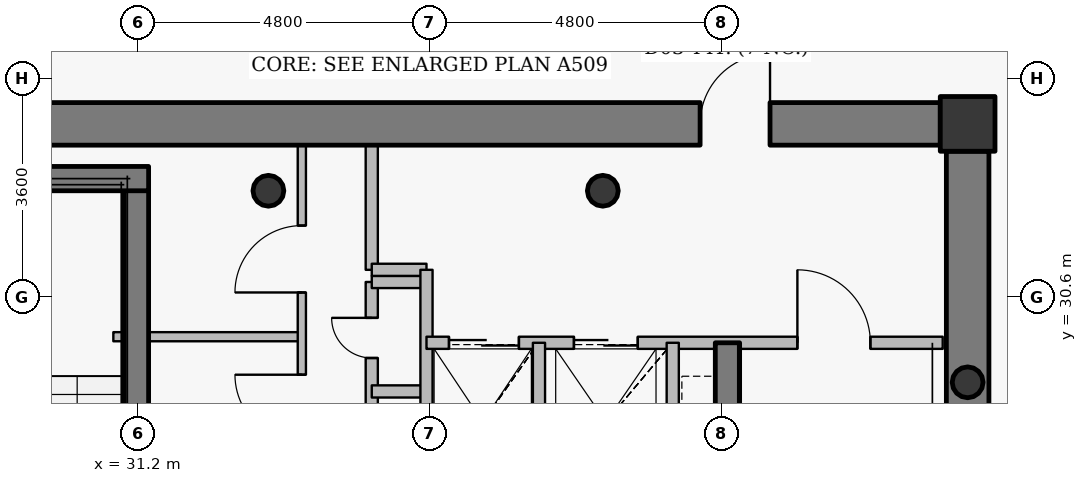
"""IFC4 building model, lengths in metres.
Left out: names, types, materials, properties, quantities, classifications, styles, units other than length and angle.
Written with IfcOpenShell. Run it as: python <this file> out.ifc"""

import sys

from ifc_helpers import new_model, si_unit, direction, frame, frame_2d, origin, origin_2d, place, context, subcontext, project, spatial, rectangle, hollow_circle, extrude, source, transform, mapped, element, fill, save


model = new_model("IFC4")
c1 = context("Model", 3, precision=1e-05, world=origin(), true_north=direction((0.0, 1.0)))
c2 = subcontext(c1, "Body", "Model", "MODEL_VIEW")
j1 = project(units=[si_unit("LENGTHUNIT", "METRE"), si_unit("PLANEANGLEUNIT", "RADIAN")], contexts=[c1])
p1 = place(None, origin())
s1 = spatial("IfcSite", under=j1, at=p1, CompositionType="ELEMENT")
p2 = place(p1, origin())
s2 = spatial("IfcBuilding", under=s1, at=p2, CompositionType="ELEMENT")
p3 = place(p2, frame((0.0, 0.0, 335.4)))
s3 = spatial("IfcBuildingStorey", under=s2, at=p3, CompositionType="ELEMENT", Elevation=335.4)
p4 = place(p3, frame((44.85, 33.45, 0.0), z_axis=(0.0, 0.0, 1.0), x_axis=(1.0, 0.0, 0.0)))
e1 = element("IfcColumn", 1, at=p4, inside=s3, PredefinedType="COLUMN", context=c2, shape_type="SweptSolid", body=[
    extrude(rectangle(XDim=0.9, YDim=0.9, at=origin_2d()), origin(), (0.0, 0.0, 1.0), 3.8),
])
for number, where, z_axis, x_axis in (
    (2, (38.85, 32.35, 0.0), (0.0, 0.0, 1.0), (1.0, 0.0, 0.0)),
    (3, (33.35, 32.35, 0.0), (0.0, 0.0, 1.0), (1.0, 0.0, 0.0)),
):
    element("IfcColumn", number, at=place(p3, frame(where, z_axis=z_axis, x_axis=x_axis)), inside=s3, PredefinedType="COLUMN", context=c2, shape_type="SweptSolid", body=[
        extrude(hollow_circle(Radius=0.254, WallThickness=0.02, at=origin_2d()), origin(), (0.0, 0.0, 1.0), 3.8),
    ])
p5 = place(p3, frame((31.18, 27.8, 0.0), z_axis=(0.0, 0.0, 1.0), x_axis=(0.0, 1.0, 0.0)))
e4 = element("IfcWall", 4, at=p5, inside=s3, PredefinedType="SHEAR", context=c2, shape_type="SweptSolid", body=[
    extrude(rectangle(XDim=4.75, YDim=0.4, at=frame_2d((2.375, 0.0))), origin(), (0.0, 0.0, 1.0), 3.8),
])
p6 = place(p3, frame((27.25, 32.55, 0.0), z_axis=(0.0, 0.0, 1.0), x_axis=(1.0, 0.0, 0.0)))
e5 = element("IfcWall", 5, at=p6, inside=s3, PredefinedType="SHEAR", context=c2, shape_type="SweptSolid", body=[
    extrude(rectangle(XDim=4.13, YDim=0.4, at=frame_2d((2.065, 0.0))), origin(), (0.0, 0.0, 1.0), 3.8),
])
p7 = place(p3, frame((27.6, 33.45, 0.0), z_axis=(0.0, 0.0, 1.0), x_axis=(1.0, 0.0, 0.0)))
e6 = element("IfcWall", 6, at=p7, inside=s3, PredefinedType="SHEAR", context=c2, shape_type="SweptSolid", body=[
    extrude(rectangle(XDim=16.8, YDim=0.7, at=frame_2d((8.4, 0.0))), origin(), (0.0, 0.0, 1.0), 3.1),
])
p8 = place(p7, frame((12.85, 0.0, 0.0)))
e7 = element("IfcOpeningElement", 7, at=p8, cuts=e6, PredefinedType="OPENING", context=c2, shape_type="SweptSolid", body=[
    extrude(rectangle(XDim=1.15, YDim=2.15, at=origin_2d()), frame((0.575, 0.36, 1.075), z_axis=(0.0, -1.0, 0.0), x_axis=(1.0, 0.0, 0.0)), (0.0, 0.0, 1.0), 0.72),
])
p9 = place(p3, frame((44.85, 33.0, 0.0), z_axis=(0.0, 0.0, 1.0), x_axis=(0.0, -1.0, 0.0)))
e8 = element("IfcWall", 8, at=p9, inside=s3, PredefinedType="SHEAR", context=c2, shape_type="SweptSolid", body=[
    extrude(rectangle(XDim=12.0, YDim=0.7, at=frame_2d((6.0, 0.0))), origin(), (0.0, 0.0, 1.0), 3.1),
])
p10 = place(p3, frame((40.9, 27.25, 0.0), z_axis=(0.0, 0.0, 1.0), x_axis=(0.0, 1.0, 0.0)))
e9 = element("IfcWall", 9, at=p10, inside=s3, PredefinedType="SHEAR", context=c2, shape_type="SweptSolid", body=[
    extrude(rectangle(XDim=2.6, YDim=0.4, at=frame_2d((1.3, 0.0))), origin(), (0.0, 0.0, 1.0), 3.15),
])
p11 = place(p3, frame((44.85, 29.2, 0.0), z_axis=(0.0, 0.0, 1.0), x_axis=(1.0, 0.0, 0.0)))
e10 = element("IfcColumn", 10, at=p11, inside=s3, PredefinedType="COLUMN", context=c2, shape_type="SweptSolid", body=[
    extrude(hollow_circle(Radius=0.254, WallThickness=0.02, at=origin_2d()), origin(), (0.0, 0.0, 1.0), 3.8),
])
p12 = place(p3, frame((30.8, 29.95, 0.0), z_axis=(0.0, 0.0, 1.0), x_axis=(1.0, 0.0, 0.0)))
e11 = element("IfcWall", 11, at=p12, inside=s3, PredefinedType="PARTITIONING", context=c2, shape_type="SweptSolid", body=[
    extrude(rectangle(XDim=3.1, YDim=0.15, at=frame_2d((1.55, 0.0))), origin(), (0.0, 0.0, 1.0), 3.135),
])
p13 = place(p3, frame((33.9, 27.56, 0.0), z_axis=(0.0, 0.0, 1.0), x_axis=(0.0, 1.0, 0.0)))
e12 = element("IfcWall", 12, at=p13, inside=s3, PredefinedType="PARTITIONING", context=c2, shape_type="SweptSolid", body=[
    extrude(rectangle(XDim=5.54, YDim=0.135, at=frame_2d((2.77, 0.0))), origin(), (0.0, 0.0, 1.0), 3.135),
])
p14 = place(p13, frame((0.665, 0.0, 0.0)))
e13 = element("IfcOpeningElement", 13, at=p14, cuts=e12, PredefinedType="OPENING", context=c2, shape_type="SweptSolid", body=[
    extrude(rectangle(XDim=1.1, YDim=2.15, at=origin_2d()), frame((0.55, 0.078, 1.075), z_axis=(0.0, -1.0, 0.0), x_axis=(1.0, 0.0, 0.0)), (0.0, 0.0, 1.0), 0.155),
])
p15 = place(p13, frame((3.117, 0.0, 0.0)))
e14 = element("IfcOpeningElement", 14, at=p15, cuts=e12, PredefinedType="OPENING", context=c2, shape_type="SweptSolid", body=[
    extrude(rectangle(XDim=1.1, YDim=2.15, at=origin_2d()), frame((0.55, 0.078, 1.075), z_axis=(0.0, -1.0, 0.0), x_axis=(1.0, 0.0, 0.0)), (0.0, 0.0, 1.0), 0.155),
])
p16 = place(p3, frame((35.05, 27.25, 0.0), z_axis=(0.0, 0.0, 1.0), x_axis=(0.0, 1.0, 0.0)))
e15 = element("IfcWall", 15, at=p16, inside=s3, PredefinedType="PARTITIONING", context=c2, shape_type="SweptSolid", body=[
    extrude(rectangle(XDim=3.6, YDim=0.2, at=frame_2d((1.8, 0.0))), origin(), (0.0, 0.0, 1.0), 3.55),
])
p17 = place(p16, frame((0.59, 0.0, 0.0)))
e16 = element("IfcOpeningElement", 16, at=p17, cuts=e15, PredefinedType="OPENING", context=c2, shape_type="SweptSolid", body=[
    extrude(rectangle(XDim=0.66, YDim=2.05, at=origin_2d()), frame((0.33, 0.11, 1.025), z_axis=(0.0, -1.0, 0.0), x_axis=(1.0, 0.0, 0.0)), (0.0, 0.0, 1.0), 0.22),
])
p18 = place(p16, frame((2.35, 0.0, 0.0)))
e17 = element("IfcOpeningElement", 17, at=p18, cuts=e15, PredefinedType="OPENING", context=c2, shape_type="SweptSolid", body=[
    extrude(rectangle(XDim=0.66, YDim=2.05, at=origin_2d()), frame((0.33, 0.11, 1.025), z_axis=(0.0, -1.0, 0.0), x_axis=(1.0, 0.0, 0.0)), (0.0, 0.0, 1.0), 0.22),
])
for number, where, z_axis, x_axis in (
    (18, (35.05, 29.05, 0.0), (0.0, 0.0, 1.0), (1.0, 0.0, 0.0)),
    (19, (35.05, 30.85, 0.0), (0.0, 0.0, 1.0), (1.0, 0.0, 0.0)),
):
    element("IfcWall", number, at=place(p3, frame(where, z_axis=z_axis, x_axis=x_axis)), inside=s3, PredefinedType="PARTITIONING", context=c2, shape_type="SweptSolid", body=[
        extrude(rectangle(XDim=0.9, YDim=0.2, at=frame_2d((0.45, 0.0))), origin(), (0.0, 0.0, 1.0), 3.55),
    ])
p19 = place(p3, frame((35.05, 31.05, 0.0), z_axis=(0.0, 0.0, 1.0), x_axis=(0.0, 1.0, 0.0)))
e20 = element("IfcWall", 20, at=p19, inside=s3, PredefinedType="PARTITIONING", context=c2, shape_type="SweptSolid", body=[
    extrude(rectangle(XDim=2.05, YDim=0.2, at=frame_2d((1.025, 0.0))), origin(), (0.0, 0.0, 1.0), 3.135),
])
p20 = place(p3, frame((35.05, 31.05, 0.0), z_axis=(0.0, 0.0, 1.0), x_axis=(1.0, 0.0, 0.0)))
e21 = element("IfcWall", 21, at=p20, inside=s3, PredefinedType="PARTITIONING", context=c2, shape_type="SweptSolid", body=[
    extrude(rectangle(XDim=0.9, YDim=0.2, at=frame_2d((0.45, 0.0))), origin(), (0.0, 0.0, 1.0), 3.55),
])
p21 = place(p3, frame((35.95, 27.25, 0.0), z_axis=(0.0, 0.0, 1.0), x_axis=(0.0, 1.0, 0.0)))
e22 = element("IfcWall", 22, at=p21, inside=s3, PredefinedType="PARTITIONING", context=c2, shape_type="SweptSolid", body=[
    extrude(rectangle(XDim=3.8, YDim=0.2, at=frame_2d((1.9, 0.0))), origin(), (0.0, 0.0, 1.0), 3.55),
])
p22 = place(p3, frame((35.95, 29.85, 0.0), z_axis=(0.0, 0.0, 1.0), x_axis=(1.0, 0.0, 0.0)))
e23 = element("IfcWall", 23, at=p22, inside=s3, PredefinedType="PARTITIONING", context=c2, shape_type="SweptSolid", body=[
    extrude(rectangle(XDim=8.49, YDim=0.2, at=frame_2d((4.245, 0.0))), origin(), (0.0, 0.0, 1.0), 3.135),
])
p23 = place(p22, frame((6.1, 0.0, 0.0)))
e24 = element("IfcOpeningElement", 24, at=p23, cuts=e23, PredefinedType="OPENING", context=c2, shape_type="SweptSolid", body=[
    extrude(rectangle(XDim=1.2, YDim=2.15, at=origin_2d()), frame((0.6, 0.11, 1.075), z_axis=(0.0, -1.0, 0.0), x_axis=(1.0, 0.0, 0.0)), (0.0, 0.0, 1.0), 0.22),
])
p24 = place(p22, frame((0.37, 0.0, 0.0)))
e25 = element("IfcOpeningElement", 25, at=p24, cuts=e23, PredefinedType="OPENING", context=c2, shape_type="SweptSolid", body=[
    extrude(rectangle(XDim=1.15, YDim=2.15, at=origin_2d()), frame((0.575, 0.11, 1.075), z_axis=(0.0, -1.0, 0.0), x_axis=(1.0, 0.0, 0.0)), (0.0, 0.0, 1.0), 0.22),
])
p25 = place(p22, frame((2.425, 0.0, 0.0)))
e26 = element("IfcOpeningElement", 26, at=p25, cuts=e23, PredefinedType="OPENING", context=c2, shape_type="SweptSolid", body=[
    extrude(rectangle(XDim=1.05, YDim=2.15, at=origin_2d()), frame((0.525, 0.11, 1.075), z_axis=(0.0, -1.0, 0.0), x_axis=(1.0, 0.0, 0.0)), (0.0, 0.0, 1.0), 0.22),
])
p26 = place(p3, frame((37.8, 27.25, 0.0), z_axis=(0.0, 0.0, 1.0), x_axis=(0.0, 1.0, 0.0)))
e27 = element("IfcWall", 27, at=p26, inside=s3, PredefinedType="PARTITIONING", context=c2, shape_type="SweptSolid", body=[
    extrude(rectangle(XDim=2.6, YDim=0.2, at=frame_2d((1.3, 0.0))), origin(), (0.0, 0.0, 1.0), 3.55),
])
p27 = place(p3, frame((40.0, 25.45, 0.0), z_axis=(0.0, 0.0, 1.0), x_axis=(0.0, 1.0, 0.0)))
e28 = element("IfcWall", 28, at=p27, inside=s3, PredefinedType="PARTITIONING", context=c2, shape_type="SweptSolid", body=[
    extrude(rectangle(XDim=4.4, YDim=0.2, at=frame_2d((2.2, 0.0))), origin(), (0.0, 0.0, 1.0), 3.55),
])
p28 = place(p3, frame((45.2, 33.8, 0.0), z_axis=(0.0, 0.0, 1.0), x_axis=(-1.0, 0.0, 0.0)))
e29 = element("IfcWall", 29, at=p28, inside=s3, PredefinedType="PARTITIONING", context=c2, shape_type="SweptSolid", body=[
    extrude(rectangle(XDim=0.79, YDim=0.135, at=frame_2d((0.395, 0.0))), origin(), (0.0, 0.0, 1.0), 3.085),
])
p29 = place(p3, frame((45.2, 33.01, 0.0), z_axis=(0.0, 0.0, 1.0), x_axis=(0.0, 1.0, 0.0)))
e30 = element("IfcWall", 30, at=p29, inside=s3, PredefinedType="PARTITIONING", context=c2, shape_type="SweptSolid", body=[
    extrude(rectangle(XDim=0.482, YDim=0.135, at=frame_2d((0.241, 0.0))), origin(), (0.0, 0.0, 1.0), 3.55),
])
m1 = source(origin(), c2, "Body", "SweptSolid", [
    extrude(rectangle(XDim=1.15, YDim=2.15, at=origin_2d()), frame((0.575, 0.025, 1.075), z_axis=(0.0, -1.0, 0.0), x_axis=(1.0, 0.0, 0.0)), (0.0, 0.0, 1.0), 0.05),
])
p30 = place(p8, origin())
e31 = element("IfcDoor", 31, at=p30, inside=s3, OperationType="SINGLE_SWING_RIGHT", PredefinedType="DOOR", context=c2, shape_type="MappedRepresentation", body=[
    mapped(m1, transform((0.0, 0.0, 0.0), x_axis=(1.0, 0.0, 0.0), y_axis=(0.0, 1.0, 0.0), z_axis=(0.0, 0.0, 1.0), scale=1.0)),
])
fill(e7, e31)
m2 = source(origin(), c2, "Body", "SweptSolid", [
    extrude(rectangle(XDim=1.2, YDim=2.15, at=origin_2d()), frame((0.6, 0.025, 1.075), z_axis=(0.0, -1.0, 0.0), x_axis=(1.0, 0.0, 0.0)), (0.0, 0.0, 1.0), 0.05),
])
p31 = place(p23, origin())
e32 = element("IfcDoor", 32, at=p31, inside=s3, OperationType="SINGLE_SWING_LEFT", PredefinedType="DOOR", context=c2, shape_type="MappedRepresentation", body=[
    mapped(m2, transform((0.0, 0.0, 0.0), x_axis=(1.0, 0.0, 0.0), y_axis=(0.0, 1.0, 0.0), z_axis=(0.0, 0.0, 1.0), scale=1.0)),
])
fill(e24, e32)
m3 = source(origin(), c2, "Body", "SweptSolid", [
    extrude(rectangle(XDim=1.15, YDim=2.15, at=origin_2d()), frame((0.575, 0.025, 1.075), z_axis=(0.0, -1.0, 0.0), x_axis=(1.0, 0.0, 0.0)), (0.0, 0.0, 1.0), 0.05),
])
p32 = place(p24, origin())
e33 = element("IfcDoor", 33, at=p32, inside=s3, OperationType="DOUBLE_DOOR_SLIDING", PredefinedType="USERDEFINED", context=c2, shape_type="MappedRepresentation", body=[
    mapped(m3, transform((0.0, 0.0, 0.0), x_axis=(1.0, 0.0, 0.0), y_axis=(0.0, 1.0, 0.0), z_axis=(0.0, 0.0, 1.0), scale=1.0)),
])
fill(e25, e33)
m4 = source(origin(), c2, "Body", "SweptSolid", [
    extrude(rectangle(XDim=1.05, YDim=2.15, at=origin_2d()), frame((0.525, 0.025, 1.075), z_axis=(0.0, -1.0, 0.0), x_axis=(1.0, 0.0, 0.0)), (0.0, 0.0, 1.0), 0.05),
])
p33 = place(p25, origin())
e34 = element("IfcDoor", 34, at=p33, inside=s3, OperationType="DOUBLE_DOOR_SLIDING", PredefinedType="USERDEFINED", context=c2, shape_type="MappedRepresentation", body=[
    mapped(m4, transform((0.0, 0.0, 0.0), x_axis=(1.0, 0.0, 0.0), y_axis=(0.0, 1.0, 0.0), z_axis=(0.0, 0.0, 1.0), scale=1.0)),
])
fill(e26, e34)
m5 = source(origin(), c2, "Body", "SweptSolid", [
    extrude(rectangle(XDim=0.66, YDim=2.05, at=origin_2d()), frame((0.33, 0.025, 1.025), z_axis=(0.0, -1.0, 0.0), x_axis=(1.0, 0.0, 0.0)), (0.0, 0.0, 1.0), 0.05),
])
p34 = place(p18, origin())
e35 = element("IfcDoor", 35, at=p34, inside=s3, OperationType="SINGLE_SWING_RIGHT", PredefinedType="USERDEFINED", context=c2, shape_type="MappedRepresentation", body=[
    mapped(m5, transform((0.0, 0.0, 0.0), x_axis=(1.0, 0.0, 0.0), y_axis=(0.0, 1.0, 0.0), z_axis=(0.0, 0.0, 1.0), scale=1.0)),
])
fill(e17, e35)
m6 = source(origin(), c2, "Body", "SweptSolid", [
    extrude(rectangle(XDim=1.1, YDim=2.15, at=origin_2d()), frame((0.55, 0.025, 1.075), z_axis=(0.0, -1.0, 0.0), x_axis=(1.0, 0.0, 0.0)), (0.0, 0.0, 1.0), 0.05),
])
p35 = place(p14, origin())
e36 = element("IfcDoor", 36, at=p35, inside=s3, OperationType="SINGLE_SWING_RIGHT", PredefinedType="DOOR", context=c2, shape_type="MappedRepresentation", body=[
    mapped(m6, transform((0.0, 0.0, 0.0), x_axis=(1.0, 0.0, 0.0), y_axis=(0.0, 1.0, 0.0), z_axis=(0.0, 0.0, 1.0), scale=1.0)),
])
fill(e13, e36)
p36 = place(p15, origin())
e37 = element("IfcDoor", 37, at=p36, inside=s3, OperationType="SINGLE_SWING_LEFT", PredefinedType="DOOR", context=c2, shape_type="MappedRepresentation", body=[
    mapped(m6, transform((0.0, 0.0, 0.0), x_axis=(1.0, 0.0, 0.0), y_axis=(0.0, 1.0, 0.0), z_axis=(0.0, 0.0, 1.0), scale=1.0)),
])
fill(e14, e37)
save(model, sys.argv[1])
